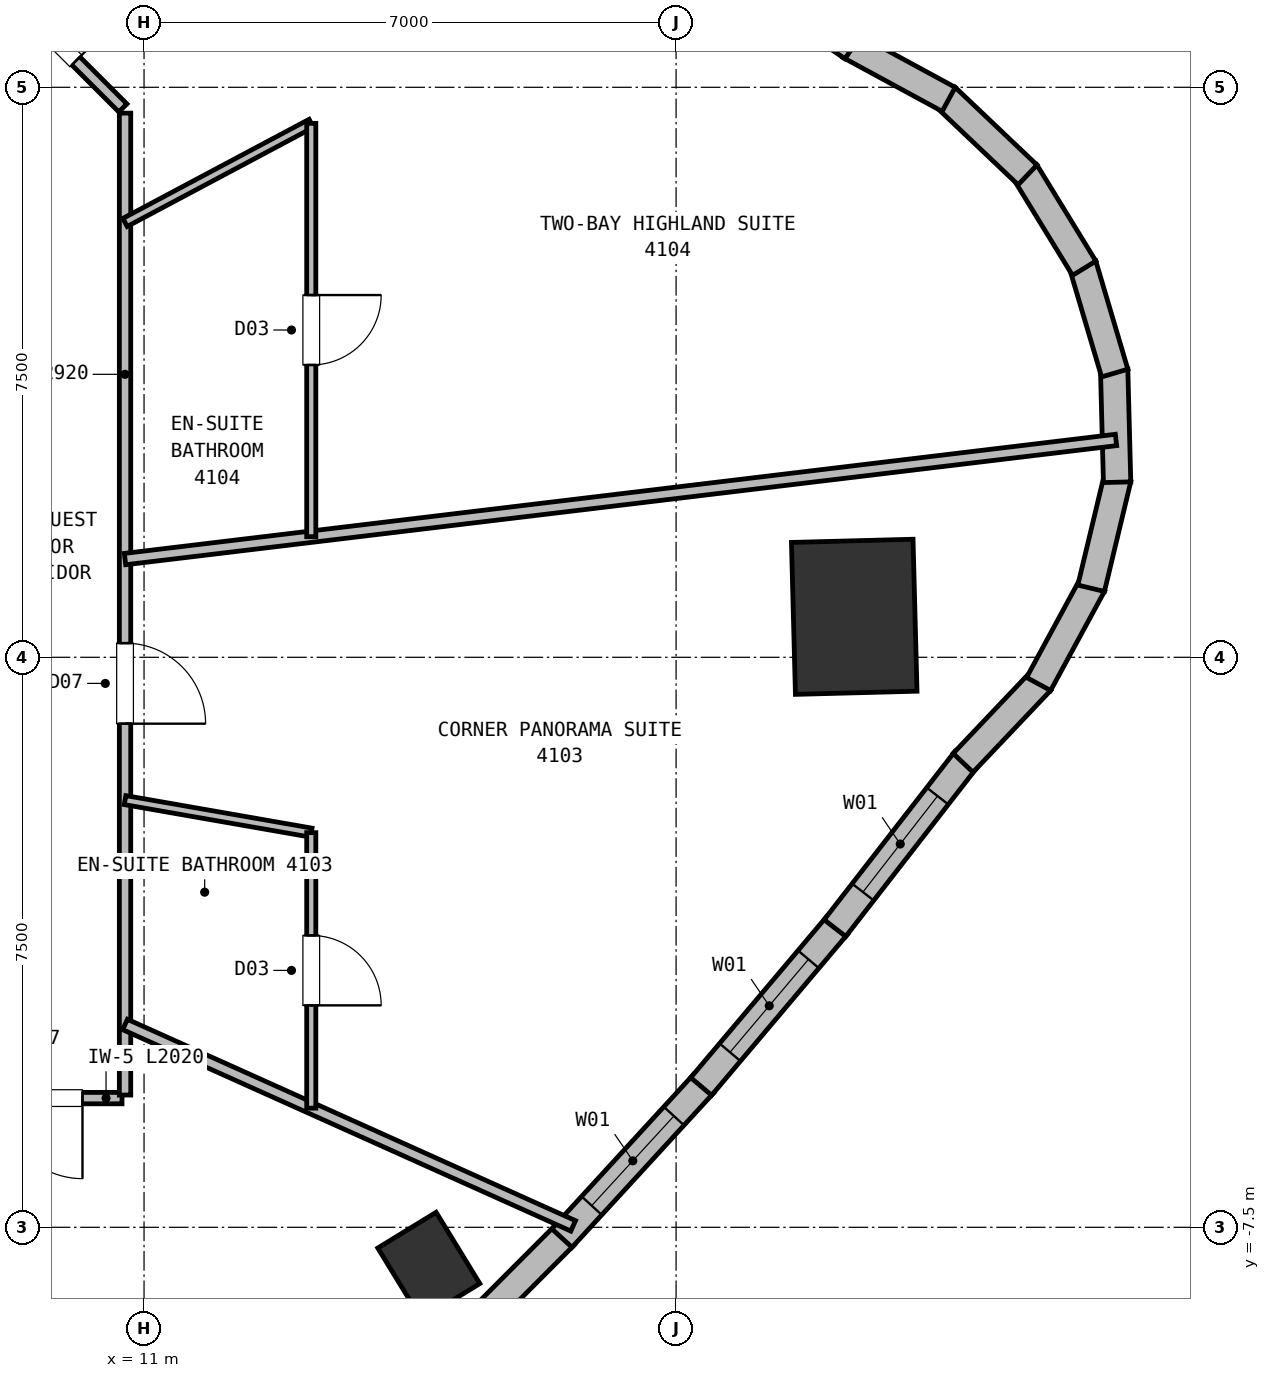
"""IFC4 building model, lengths in metres.
Left out: names, types, materials, properties, quantities, classifications, styles, units other than length and angle.
Written with IfcOpenShell. Run it as: python <this file> out.ifc"""

import sys

from ifc_helpers import new_model, si_unit, direction, frame, frame_2d, origin, origin_2d, place, context, subcontext, project, spatial, rectangle, extrude, element, fill, save


model = new_model("IFC4")
c1 = context("Model", 3, precision=1e-05, world=origin(), true_north=direction((0.0, 1.0)))
c2 = subcontext(c1, "Body", "Model", "MODEL_VIEW")
j1 = project(units=[si_unit("LENGTHUNIT", "METRE"), si_unit("PLANEANGLEUNIT", "RADIAN")], contexts=[c1])
p1 = place(None, origin())
s1 = spatial("IfcSite", under=j1, at=p1, CompositionType="ELEMENT")
p2 = place(p1, origin())
s2 = spatial("IfcBuilding", under=s1, at=p2, CompositionType="ELEMENT")
p3 = place(p2, frame((0.0, 0.0, 153.5)))
s3 = spatial("IfcBuildingStorey", under=s2, at=p3, CompositionType="ELEMENT", Elevation=153.5)
p4 = place(p3, frame((14.747, -8.007, 0.0), z_axis=(0.0, 0.0, 1.0), x_axis=(0.852640164354, 0.522498564716, 0.0)))
e1 = element("IfcColumn", 1, at=p4, inside=s3, PredefinedType="COLUMN", context=c2, shape_type="SweptSolid", body=[
    extrude(rectangle(XDim=0.9, YDim=1.1, at=origin_2d()), origin(), (0.0, 0.0, 1.0), 3.75),
])
p5 = place(p3, frame((20.344, 0.533, 0.0), z_axis=(0.0, 0.0, 1.0), x_axis=(0.999657324976, 0.026176948308, 0.0)))
e2 = element("IfcColumn", 2, at=p5, inside=s3, PredefinedType="COLUMN", context=c2, shape_type="SweptSolid", body=[
    extrude(rectangle(XDim=1.6, YDim=2.0, at=origin_2d()), origin(), (0.0, 0.0, 1.0), 3.75),
])
p6 = place(p3, frame((16.533, -7.606, 0.0), z_axis=(0.0, 0.0, 1.0), x_axis=(-0.706305628683, -0.70790702701, 0.0)))
e3 = element("IfcWall", 3, at=p6, inside=s3, PredefinedType="SOLIDWALL", context=c2, shape_type="SweptSolid", body=[
    extrude(rectangle(XDim=2.744, YDim=0.36, at=frame_2d((1.372, 0.0))), origin(), (0.0, 0.0, 1.0), 3.5),
])
p7 = place(p3, frame((18.363, -5.609, 0.0), z_axis=(0.0, 0.0, 1.0), x_axis=(-0.676049215707, -0.73685647038, 0.0)))
e4 = element("IfcWall", 4, at=p7, inside=s3, PredefinedType="SOLIDWALL", context=c2, shape_type="SweptSolid", body=[
    extrude(rectangle(XDim=2.758, YDim=0.36, at=frame_2d((1.379, 0.0))), origin(), (0.0, 0.0, 1.0), 3.5),
])
p8 = place(p7, frame((0.579, 0.0, 0.72)))
e5 = element("IfcOpeningElement", 5, at=p8, cuts=e4, PredefinedType="OPENING", context=c2, shape_type="SweptSolid", body=[
    extrude(rectangle(XDim=1.6, YDim=1.88, at=frame_2d((0.8, 0.94))), frame((0.0, 0.19, 0.0), z_axis=(0.0, -1.0, 0.0), x_axis=(1.0, 0.0, 0.0)), (0.0, 0.0, 1.0), 0.38),
])
p9 = place(p3, frame((20.121, -3.524, 0.0), z_axis=(0.0, 0.0, 1.0), x_axis=(-0.645039410349, -0.764149304192, 0.0)))
e6 = element("IfcWall", 6, at=p9, inside=s3, PredefinedType="SOLIDWALL", context=c2, shape_type="SweptSolid", body=[
    extrude(rectangle(XDim=2.777, YDim=0.36, at=frame_2d((1.389, 0.0))), origin(), (0.0, 0.0, 1.0), 3.5),
])
p10 = place(p9, frame((0.589, 0.0, 0.72)))
e7 = element("IfcOpeningElement", 7, at=p10, cuts=e6, PredefinedType="OPENING", context=c2, shape_type="SweptSolid", body=[
    extrude(rectangle(XDim=1.6, YDim=1.88, at=frame_2d((0.8, 0.94))), frame((0.0, 0.19, 0.0), z_axis=(0.0, -1.0, 0.0), x_axis=(1.0, 0.0, 0.0)), (0.0, 0.0, 1.0), 0.38),
])
p11 = place(p3, frame((21.808, -1.351, 0.0), z_axis=(0.0, 0.0, 1.0), x_axis=(-0.613427584593, -0.789750972434, 0.0)))
e8 = element("IfcWall", 8, at=p11, inside=s3, PredefinedType="SOLIDWALL", context=c2, shape_type="SweptSolid", body=[
    extrude(rectangle(XDim=2.801, YDim=0.36, at=frame_2d((1.4, 0.0))), origin(), (0.0, 0.0, 1.0), 3.5),
])
p12 = place(p11, frame((0.601, 0.0, 0.72)))
e9 = element("IfcOpeningElement", 9, at=p12, cuts=e8, PredefinedType="OPENING", context=c2, shape_type="SweptSolid", body=[
    extrude(rectangle(XDim=1.6, YDim=1.88, at=frame_2d((0.8, 0.94))), frame((0.0, 0.19, 0.0), z_axis=(0.0, -1.0, 0.0), x_axis=(1.0, 0.0, 0.0)), (0.0, 0.0, 1.0), 0.38),
])
p13 = place(p3, frame((22.799, -0.311, 0.0), z_axis=(0.0, 0.0, 1.0), x_axis=(-0.688377955726, -0.725352183474, 0.0)))
e10 = element("IfcWall", 10, at=p13, inside=s3, PredefinedType="SOLIDWALL", context=c2, shape_type="SweptSolid", body=[
    extrude(rectangle(XDim=1.486, YDim=0.36, at=frame_2d((0.743, 0.0))), origin(), (0.0, 0.0, 1.0), 3.5),
])
p14 = place(p3, frame((23.479, 0.955, 0.0), z_axis=(0.0, 0.0, 1.0), x_axis=(-0.477124494484, -0.878835716595, 0.0)))
e11 = element("IfcWall", 11, at=p14, inside=s3, PredefinedType="SOLIDWALL", context=c2, shape_type="SweptSolid", body=[
    extrude(rectangle(XDim=1.486, YDim=0.36, at=frame_2d((0.743, 0.0))), origin(), (0.0, 0.0, 1.0), 3.5),
])
for number, where, z_axis, x_axis in (
    (12, (23.808, 2.353, 0.0), (0.0, 0.0, 1.0), (-0.234, -0.972, 0.0)),
    (13, (23.763, 3.789, 0.0), (0.0, 0.0, 1.0), (0.026, -1.0, 0.0)),
):
    element("IfcWall", number, at=place(p3, frame(where, z_axis=z_axis, x_axis=x_axis)), inside=s3, PredefinedType="SOLIDWALL", context=c2, shape_type="SweptSolid", body=[
        extrude(rectangle(XDim=1.486, YDim=0.36, at=frame_2d((0.743, 0.0))), origin(), (0.0, 0.0, 1.0), 3.5),
    ])
for number, where, z_axis, x_axis in (
    (14, (23.349, 5.165, 0.0), (0.0, 0.0, 1.0), (0.284, -0.959, 0.0)),
    (15, (22.593, 6.386, 0.0), (0.0, 0.0, 1.0), (0.523, -0.853, 0.0)),
):
    element("IfcWall", number, at=place(p3, frame(where, z_axis=z_axis, x_axis=x_axis)), inside=s3, PredefinedType="SOLIDWALL", context=c2, shape_type="SweptSolid", body=[
        extrude(rectangle(XDim=1.486, YDim=0.36, at=frame_2d((0.743, 0.0))), origin(), (0.0, 0.0, 1.0), 3.5),
    ])
p15 = place(p3, frame((21.546, 7.37, 0.0), z_axis=(0.0, 0.0, 1.0), x_axis=(0.725348001868, -0.688382361908, 0.0)))
e16 = element("IfcWall", 16, at=p15, inside=s3, PredefinedType="SOLIDWALL", context=c2, shape_type="SweptSolid", body=[
    extrude(rectangle(XDim=1.486, YDim=0.36, at=frame_2d((0.743, 0.0))), origin(), (0.0, 0.0, 1.0), 3.5),
])
p16 = place(p3, frame((20.281, 8.05, 0.0), z_axis=(0.0, 0.0, 1.0), x_axis=(0.87890460574, -0.476997582812, 0.0)))
e17 = element("IfcWall", 17, at=p16, inside=s3, PredefinedType="SOLIDWALL", context=c2, shape_type="SweptSolid", body=[
    extrude(rectangle(XDim=1.486, YDim=0.36, at=frame_2d((0.743, 0.0))), origin(), (0.0, 0.0, 1.0), 3.5),
])
p17 = place(p3, frame((18.097, 9.537, 0.0), z_axis=(0.0, 0.0, 1.0), x_axis=(0.827020963394, -0.562171082596, 0.0)))
e18 = element("IfcWall", 18, at=p17, inside=s3, PredefinedType="SOLIDWALL", context=c2, shape_type="SweptSolid", body=[
    extrude(rectangle(XDim=2.692, YDim=0.36, at=frame_2d((1.346, 0.0))), origin(), (0.0, 0.0, 1.0), 3.5),
])
p18 = place(p17, frame((0.646, 0.0, 0.72)))
e19 = element("IfcOpeningElement", 19, at=p18, cuts=e18, PredefinedType="OPENING", context=c2, shape_type="SweptSolid", body=[
    extrude(rectangle(XDim=1.4, YDim=1.84, at=frame_2d((0.7, 0.92))), frame((0.0, 0.19, 0.0), z_axis=(0.0, -1.0, 0.0), x_axis=(1.0, 0.0, 0.0)), (0.0, 0.0, 1.0), 0.38),
])
p19 = place(p3, frame((10.71, -5.8, 0.0), z_axis=(0.0, 0.0, 1.0), x_axis=(-1.0, 0.0, 0.0)))
e20 = element("IfcWall", 20, at=p19, inside=s3, PredefinedType="PARTITIONING", context=c2, shape_type="SweptSolid", body=[
    extrude(rectangle(XDim=2.02, YDim=0.15, at=frame_2d((1.01, 0.0))), origin(), (0.0, 0.0, 1.0), 3.5),
])
p20 = place(p19, frame((0.52, 0.0, 0.0)))
e21 = element("IfcOpeningElement", 21, at=p20, cuts=e20, PredefinedType="OPENING", context=c2, shape_type="SweptSolid", body=[
    extrude(rectangle(XDim=1.06, YDim=2.15, at=frame_2d((0.53, 1.075))), frame((0.0, 0.085, 0.0), z_axis=(0.0, -1.0, 0.0), x_axis=(1.0, 0.0, 0.0)), (0.0, 0.0, 1.0), 0.17),
])
p21 = place(p3, frame((10.75, 7.16, 0.0), z_axis=(0.0, 0.0, 1.0), x_axis=(0.0, -1.0, 0.0)))
e22 = element("IfcWall", 22, at=p21, inside=s3, PredefinedType="PARTITIONING", context=c2, shape_type="SweptSolid", body=[
    extrude(rectangle(XDim=12.92, YDim=0.15, at=frame_2d((6.46, 0.0))), origin(), (0.0, 0.0, 1.0), 3.5),
])
p22 = place(p21, frame((6.973, 0.0, 0.0)))
e23 = element("IfcOpeningElement", 23, at=p22, cuts=e22, PredefinedType="OPENING", context=c2, shape_type="SweptSolid", body=[
    extrude(rectangle(XDim=1.06, YDim=2.15, at=frame_2d((0.53, 1.075))), frame((0.0, 0.085, 0.0), z_axis=(0.0, -1.0, 0.0), x_axis=(1.0, 0.0, 0.0)), (0.0, 0.0, 1.0), 0.17),
])
p23 = place(p3, frame((8.678, 9.272, 0.0), z_axis=(0.0, 0.0, 1.0), x_axis=(0.707106781187, -0.707106781187, 0.0)))
e24 = element("IfcWall", 24, at=p23, inside=s3, PredefinedType="PARTITIONING", context=c2, shape_type="SweptSolid", body=[
    extrude(rectangle(XDim=2.89, YDim=0.15, at=frame_2d((1.445, 0.0))), origin(), (0.0, 0.0, 1.0), 3.5),
])
p24 = place(p23, frame((0.955, 0.0, 0.0)))
e25 = element("IfcOpeningElement", 25, at=p24, cuts=e24, PredefinedType="OPENING", context=c2, shape_type="SweptSolid", body=[
    extrude(rectangle(XDim=1.06, YDim=2.15, at=frame_2d((0.53, 1.075))), frame((0.0, 0.085, 0.0), z_axis=(0.0, -1.0, 0.0), x_axis=(1.0, 0.0, 0.0)), (0.0, 0.0, 1.0), 0.17),
])
p25 = place(p3, frame((10.75, -4.831, 0.0), z_axis=(0.0, 0.0, 1.0), x_axis=(0.912119988026, -0.40992331898, 0.0)))
e26 = element("IfcWall", 26, at=p25, inside=s3, PredefinedType="PARTITIONING", context=c2, shape_type="SweptSolid", body=[
    extrude(rectangle(XDim=6.464, YDim=0.15, at=frame_2d((3.232, 0.0))), origin(), (0.0, 0.0, 1.0), 3.5),
])
p26 = place(p3, frame((10.75, -1.879, 0.0), z_axis=(0.0, 0.0, 1.0), x_axis=(0.985065866007, -0.172177930142, 0.0)))
e27 = element("IfcWall", 27, at=p26, inside=s3, PredefinedType="PARTITIONING", context=c2, shape_type="SweptSolid", body=[
    extrude(rectangle(XDim=2.487, YDim=0.12, at=frame_2d((1.244, 0.0))), origin(), (0.0, 0.0, 1.0), 3.5),
])
p27 = place(p3, frame((13.2, -2.307, 0.0), z_axis=(0.0, 0.0, 1.0), x_axis=(0.0, -1.0, 0.0)))
e28 = element("IfcWall", 28, at=p27, inside=s3, PredefinedType="PARTITIONING", context=c2, shape_type="SweptSolid", body=[
    extrude(rectangle(XDim=3.625, YDim=0.12, at=frame_2d((1.812, 0.0))), origin(), (0.0, 0.0, 1.0), 3.5),
])
p28 = place(p27, frame((1.353, 0.0, 0.0)))
e29 = element("IfcOpeningElement", 29, at=p28, cuts=e28, PredefinedType="OPENING", context=c2, shape_type="SweptSolid", body=[
    extrude(rectangle(XDim=0.92, YDim=2.1, at=frame_2d((0.46, 1.05))), frame((0.0, 0.07, 0.0), z_axis=(0.0, -1.0, 0.0), x_axis=(1.0, 0.0, 0.0)), (0.0, 0.0, 1.0), 0.14),
])
p29 = place(p3, frame((10.75, 1.292, 0.0), z_axis=(0.0, 0.0, 1.0), x_axis=(0.992851215359, 0.119358552939, 0.0)))
e30 = element("IfcWall", 30, at=p29, inside=s3, PredefinedType="PARTITIONING", context=c2, shape_type="SweptSolid", body=[
    extrude(rectangle(XDim=13.132, YDim=0.15, at=frame_2d((6.566, 0.0))), origin(), (0.0, 0.0, 1.0), 3.5),
])
p30 = place(p3, frame((13.2, 7.026, 0.0), z_axis=(0.0, 0.0, 1.0), x_axis=(-0.88275440909, -0.469834708416, 0.0)))
e31 = element("IfcWall", 31, at=p30, inside=s3, PredefinedType="PARTITIONING", context=c2, shape_type="SweptSolid", body=[
    extrude(rectangle(XDim=2.775, YDim=0.12, at=frame_2d((1.388, 0.0))), origin(), (0.0, 0.0, 1.0), 3.5),
])
p31 = place(p3, frame((13.2, 7.026, 0.0), z_axis=(0.0, 0.0, 1.0), x_axis=(0.0, -1.0, 0.0)))
e32 = element("IfcWall", 32, at=p31, inside=s3, PredefinedType="PARTITIONING", context=c2, shape_type="SweptSolid", body=[
    extrude(rectangle(XDim=5.439, YDim=0.12, at=frame_2d((2.719, 0.0))), origin(), (0.0, 0.0, 1.0), 3.5),
])
p32 = place(p31, frame((2.259, 0.0, 0.0)))
e33 = element("IfcOpeningElement", 33, at=p32, cuts=e32, PredefinedType="OPENING", context=c2, shape_type="SweptSolid", body=[
    extrude(rectangle(XDim=0.92, YDim=2.1, at=frame_2d((0.46, 1.05))), frame((0.0, 0.07, 0.0), z_axis=(0.0, -1.0, 0.0), x_axis=(1.0, 0.0, 0.0)), (0.0, 0.0, 1.0), 0.14),
])
p33 = place(p8, origin())
e34 = element("IfcWindow", 34, at=p33, inside=s3, PartitioningType="SINGLE_PANEL", PredefinedType="WINDOW", context=c2, shape_type="SweptSolid", body=[
    extrude(rectangle(XDim=1.6, YDim=1.88, at=frame_2d((0.8, 0.94))), frame((0.0, 0.03, 0.0), z_axis=(0.0, -1.0, 0.0), x_axis=(1.0, 0.0, 0.0)), (0.0, 0.0, 1.0), 0.06),
])
fill(e5, e34)
p34 = place(p10, origin())
e35 = element("IfcWindow", 35, at=p34, inside=s3, PartitioningType="SINGLE_PANEL", PredefinedType="WINDOW", context=c2, shape_type="SweptSolid", body=[
    extrude(rectangle(XDim=1.6, YDim=1.88, at=frame_2d((0.8, 0.94))), frame((0.0, 0.03, 0.0), z_axis=(0.0, -1.0, 0.0), x_axis=(1.0, 0.0, 0.0)), (0.0, 0.0, 1.0), 0.06),
])
fill(e7, e35)
p35 = place(p12, origin())
e36 = element("IfcWindow", 36, at=p35, inside=s3, PartitioningType="SINGLE_PANEL", PredefinedType="WINDOW", context=c2, shape_type="SweptSolid", body=[
    extrude(rectangle(XDim=1.6, YDim=1.88, at=frame_2d((0.8, 0.94))), frame((0.0, 0.03, 0.0), z_axis=(0.0, -1.0, 0.0), x_axis=(1.0, 0.0, 0.0)), (0.0, 0.0, 1.0), 0.06),
])
fill(e9, e36)
p36 = place(p28, origin())
e37 = element("IfcDoor", 37, at=p36, inside=s3, OperationType="SINGLE_SWING_RIGHT", PredefinedType="DOOR", context=c2, shape_type="SweptSolid", body=[
    extrude(rectangle(XDim=0.92, YDim=2.1, at=frame_2d((0.46, 1.05))), frame((0.0, 0.025, 0.0), z_axis=(0.0, -1.0, 0.0), x_axis=(1.0, 0.0, 0.0)), (0.0, 0.0, 1.0), 0.05),
])
fill(e29, e37)
p37 = place(p32, origin())
e38 = element("IfcDoor", 38, at=p37, inside=s3, OperationType="SINGLE_SWING_LEFT", PredefinedType="DOOR", context=c2, shape_type="SweptSolid", body=[
    extrude(rectangle(XDim=0.92, YDim=2.1, at=frame_2d((0.46, 1.05))), frame((0.0, 0.025, 0.0), z_axis=(0.0, -1.0, 0.0), x_axis=(1.0, 0.0, 0.0)), (0.0, 0.0, 1.0), 0.05),
])
fill(e33, e38)
p38 = place(p22, origin())
e39 = element("IfcDoor", 39, at=p38, inside=s3, OperationType="SINGLE_SWING_RIGHT", PredefinedType="DOOR", context=c2, shape_type="SweptSolid", body=[
    extrude(rectangle(XDim=1.06, YDim=2.15, at=frame_2d((0.53, 1.075))), frame((0.0, 0.025, 0.0), z_axis=(0.0, -1.0, 0.0), x_axis=(1.0, 0.0, 0.0)), (0.0, 0.0, 1.0), 0.05),
])
fill(e23, e39)
p39 = place(p24, origin())
e40 = element("IfcDoor", 40, at=p39, inside=s3, OperationType="SINGLE_SWING_RIGHT", PredefinedType="DOOR", context=c2, shape_type="SweptSolid", body=[
    extrude(rectangle(XDim=1.06, YDim=2.15, at=frame_2d((0.53, 1.075))), frame((0.0, 0.025, 0.0), z_axis=(0.0, -1.0, 0.0), x_axis=(1.0, 0.0, 0.0)), (0.0, 0.0, 1.0), 0.05),
])
fill(e25, e40)
p40 = place(p20, origin())
e41 = element("IfcDoor", 41, at=p40, inside=s3, OperationType="SINGLE_SWING_LEFT", PredefinedType="DOOR", context=c2, shape_type="SweptSolid", body=[
    extrude(rectangle(XDim=1.06, YDim=2.15, at=frame_2d((0.53, 1.075))), frame((0.0, 0.025, 0.0), z_axis=(0.0, -1.0, 0.0), x_axis=(1.0, 0.0, 0.0)), (0.0, 0.0, 1.0), 0.05),
])
fill(e21, e41)
save(model, sys.argv[1])
